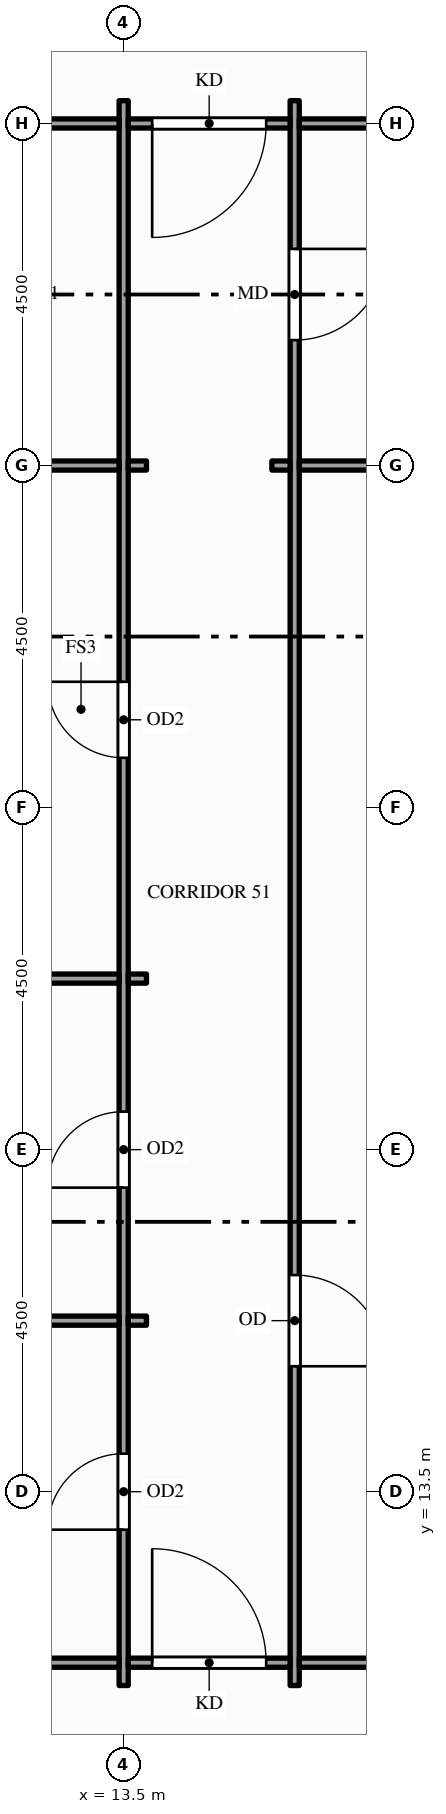
"""IFC4 building model, lengths in metres.
Left out: names, types, materials, properties, quantities, classifications, styles, units other than length and angle.
Written with IfcOpenShell. Run it as: python <this file> out.ifc"""

import sys

from ifc_helpers import new_model, si_unit, direction, frame, frame_2d, origin, place, context, subcontext, project, spatial, rectangle, extrude, element, fill, save


model = new_model("IFC4")
c1 = context("Model", 3, precision=1e-05, world=origin(), true_north=direction((0.0, 1.0)))
c2 = subcontext(c1, "Body", "Model", "MODEL_VIEW")
j1 = project(units=[si_unit("LENGTHUNIT", "METRE"), si_unit("PLANEANGLEUNIT", "RADIAN")], contexts=[c1])
p1 = place(None, origin())
s1 = spatial("IfcSite", under=j1, at=p1, CompositionType="ELEMENT")
p2 = place(p1, origin())
s2 = spatial("IfcBuilding", under=s1, at=p2, CompositionType="ELEMENT")
p3 = place(p2, frame((0.0, 0.0, 95.0)))
s3 = spatial("IfcBuildingStorey", under=s2, at=p3, CompositionType="ELEMENT", Elevation=95.0)
p4 = place(p3, frame((13.5, 10.95, 0.0), z_axis=(0.0, 0.0, 1.0), x_axis=(0.0, 1.0, 0.0)))
e1 = element("IfcWall", 1, at=p4, inside=s3, PredefinedType="PARTITIONING", context=c2, shape_type="SweptSolid", body=[
    extrude(rectangle(XDim=20.85, YDim=0.12, at=frame_2d((10.425, 0.0))), origin(), (0.0, 0.0, 1.0), 2.6),
])
p5 = place(p4, frame((2.05, 0.0, 0.0)))
e2 = element("IfcOpeningElement", 2, at=p5, cuts=e1, PredefinedType="OPENING", context=c2, shape_type="SweptSolid", body=[
    extrude(rectangle(XDim=1.0, YDim=2.1, at=frame_2d((0.5, 1.05))), frame((0.0, 0.07, 0.0), z_axis=(0.0, -1.0, 0.0), x_axis=(1.0, 0.0, 0.0)), (0.0, 0.0, 1.0), 0.14),
])
p6 = place(p4, frame((6.55, 0.0, 0.0)))
e3 = element("IfcOpeningElement", 3, at=p6, cuts=e1, PredefinedType="OPENING", context=c2, shape_type="SweptSolid", body=[
    extrude(rectangle(XDim=1.0, YDim=2.1, at=frame_2d((0.5, 1.05))), frame((0.0, 0.07, 0.0), z_axis=(0.0, -1.0, 0.0), x_axis=(1.0, 0.0, 0.0)), (0.0, 0.0, 1.0), 0.14),
])
p7 = place(p4, frame((12.205, 0.0, 0.0)))
e4 = element("IfcOpeningElement", 4, at=p7, cuts=e1, PredefinedType="OPENING", context=c2, shape_type="SweptSolid", body=[
    extrude(rectangle(XDim=1.0, YDim=2.1, at=frame_2d((0.5, 1.05))), frame((0.0, 0.07, 0.0), z_axis=(0.0, -1.0, 0.0), x_axis=(1.0, 0.0, 0.0)), (0.0, 0.0, 1.0), 0.14),
])
p8 = place(p3, frame((15.75, 10.95, 0.0), z_axis=(0.0, 0.0, 1.0), x_axis=(0.0, 1.0, 0.0)))
e5 = element("IfcWall", 5, at=p8, inside=s3, PredefinedType="PARTITIONING", context=c2, shape_type="SweptSolid", body=[
    extrude(rectangle(XDim=20.85, YDim=0.12, at=frame_2d((10.425, 0.0))), origin(), (0.0, 0.0, 1.0), 2.6),
])
p9 = place(p8, frame((17.7, 0.0, 0.0)))
e6 = element("IfcOpeningElement", 6, at=p9, cuts=e5, PredefinedType="OPENING", context=c2, shape_type="SweptSolid", body=[
    extrude(rectangle(XDim=1.2, YDim=2.1, at=frame_2d((0.6, 1.05))), frame((0.0, 0.07, 0.0), z_axis=(0.0, -1.0, 0.0), x_axis=(1.0, 0.0, 0.0)), (0.0, 0.0, 1.0), 0.14),
])
p10 = place(p8, frame((4.2, 0.0, 0.0)))
e7 = element("IfcOpeningElement", 7, at=p10, cuts=e5, PredefinedType="OPENING", context=c2, shape_type="SweptSolid", body=[
    extrude(rectangle(XDim=1.2, YDim=2.1, at=frame_2d((0.6, 1.05))), frame((0.0, 0.07, 0.0), z_axis=(0.0, -1.0, 0.0), x_axis=(1.0, 0.0, 0.0)), (0.0, 0.0, 1.0), 0.14),
])
p11 = place(p3, frame((0.15, 11.25, 0.0), z_axis=(0.0, 0.0, 1.0), x_axis=(1.0, 0.0, 0.0)))
e8 = element("IfcWall", 8, at=p11, inside=s3, PredefinedType="PARTITIONING", context=c2, shape_type="SweptSolid", body=[
    extrude(rectangle(XDim=13.29, YDim=0.12, at=frame_2d((6.645, 0.0))), origin(), (0.0, 0.0, 1.0), 2.938),
])
p12 = place(p3, frame((13.56, 11.25, 0.0), z_axis=(0.0, 0.0, 1.0), x_axis=(1.0, 0.0, 0.0)))
e9 = element("IfcWall", 9, at=p12, inside=s3, PredefinedType="PARTITIONING", context=c2, shape_type="SweptSolid", body=[
    extrude(rectangle(XDim=2.13, YDim=0.12, at=frame_2d((1.065, 0.0))), origin(), (0.0, 0.0, 1.0), 2.938),
])
p13 = place(p12, frame((0.315, 0.0, 0.0)))
e10 = element("IfcOpeningElement", 10, at=p13, cuts=e9, PredefinedType="OPENING", context=c2, shape_type="SweptSolid", body=[
    extrude(rectangle(XDim=1.5, YDim=2.1, at=frame_2d((0.75, 1.05))), frame((0.0, 0.07, 0.0), z_axis=(0.0, -1.0, 0.0), x_axis=(1.0, 0.0, 0.0)), (0.0, 0.0, 1.0), 0.14),
])
p14 = place(p3, frame((15.81, 11.25, 0.0), z_axis=(0.0, 0.0, 1.0), x_axis=(1.0, 0.0, 0.0)))
e11 = element("IfcWall", 11, at=p14, inside=s3, PredefinedType="PARTITIONING", context=c2, shape_type="SweptSolid", body=[
    extrude(rectangle(XDim=13.38, YDim=0.12, at=frame_2d((6.69, 0.0))), origin(), (0.0, 0.0, 1.0), 2.76),
])
p15 = place(p14, frame((3.54, 0.0, 0.0)))
e12 = element("IfcOpeningElement", 12, at=p15, cuts=e11, PredefinedType="OPENING", context=c2, shape_type="SweptSolid", body=[
    extrude(rectangle(XDim=1.8, YDim=2.1, at=frame_2d((0.9, 1.05))), frame((0.0, 0.07, 0.0), z_axis=(0.0, -1.0, 0.0), x_axis=(1.0, 0.0, 0.0)), (0.0, 0.0, 1.0), 0.14),
])
p16 = place(p3, frame((0.15, 15.75, 0.0), z_axis=(0.0, 0.0, 1.0), x_axis=(1.0, 0.0, 0.0)))
e13 = element("IfcWall", 13, at=p16, inside=s3, PredefinedType="PARTITIONING", context=c2, shape_type="SweptSolid", body=[
    extrude(rectangle(XDim=13.29, YDim=0.12, at=frame_2d((6.645, 0.0))), origin(), (0.0, 0.0, 1.0), 2.938),
])
p17 = place(p3, frame((13.56, 15.75, 0.0), z_axis=(0.0, 0.0, 1.0), x_axis=(1.0, 0.0, 0.0)))
e14 = element("IfcWall", 14, at=p17, inside=s3, PredefinedType="PARTITIONING", context=c2, shape_type="SweptSolid", body=[
    extrude(rectangle(XDim=0.24, YDim=0.12, at=frame_2d((0.12, 0.0))), origin(), (0.0, 0.0, 1.0), 2.938),
])
p18 = place(p3, frame((0.15, 20.25, 0.0), z_axis=(0.0, 0.0, 1.0), x_axis=(1.0, 0.0, 0.0)))
e15 = element("IfcWall", 15, at=p18, inside=s3, PredefinedType="PARTITIONING", context=c2, shape_type="SweptSolid", body=[
    extrude(rectangle(XDim=13.29, YDim=0.12, at=frame_2d((6.645, 0.0))), origin(), (0.0, 0.0, 1.0), 2.938),
])
p19 = place(p3, frame((13.56, 20.25, 0.0), z_axis=(0.0, 0.0, 1.0), x_axis=(1.0, 0.0, 0.0)))
e16 = element("IfcWall", 16, at=p19, inside=s3, PredefinedType="PARTITIONING", context=c2, shape_type="SweptSolid", body=[
    extrude(rectangle(XDim=0.24, YDim=0.12, at=frame_2d((0.12, 0.0))), origin(), (0.0, 0.0, 1.0), 2.938),
])
p20 = place(p3, frame((9.56, 27.0, 0.0), z_axis=(0.0, 0.0, 1.0), x_axis=(1.0, 0.0, 0.0)))
e17 = element("IfcWall", 17, at=p20, inside=s3, PredefinedType="PARTITIONING", context=c2, shape_type="SweptSolid", body=[
    extrude(rectangle(XDim=3.88, YDim=0.12, at=frame_2d((1.94, 0.0))), origin(), (0.0, 0.0, 1.0), 2.938),
])
for number, where, z_axis, x_axis in (
    (18, (13.56, 27.0, 0.0), (0.0, 0.0, 1.0), (1.0, 0.0, 0.0)),
    (19, (15.45, 27.0, 0.0), (0.0, 0.0, 1.0), (1.0, 0.0, 0.0)),
):
    element("IfcWall", number, at=place(p3, frame(where, z_axis=z_axis, x_axis=x_axis)), inside=s3, PredefinedType="PARTITIONING", context=c2, shape_type="SweptSolid", body=[
        extrude(rectangle(XDim=0.24, YDim=0.12, at=frame_2d((0.12, 0.0))), origin(), (0.0, 0.0, 1.0), 2.938),
    ])
p21 = place(p3, frame((15.81, 27.0, 0.0), z_axis=(0.0, 0.0, 1.0), x_axis=(1.0, 0.0, 0.0)))
e20 = element("IfcWall", 20, at=p21, inside=s3, PredefinedType="PARTITIONING", context=c2, shape_type="SweptSolid", body=[
    extrude(rectangle(XDim=8.04, YDim=0.12, at=frame_2d((4.02, 0.0))), origin(), (0.0, 0.0, 1.0), 2.938),
])
p22 = place(p3, frame((9.56, 31.5, 0.0), z_axis=(0.0, 0.0, 1.0), x_axis=(1.0, 0.0, 0.0)))
e21 = element("IfcWall", 21, at=p22, inside=s3, PredefinedType="PARTITIONING", context=c2, shape_type="SweptSolid", body=[
    extrude(rectangle(XDim=3.88, YDim=0.12, at=frame_2d((1.94, 0.0))), origin(), (0.0, 0.0, 1.0), 2.938),
])
p23 = place(p22, frame((1.44, 0.0, 0.0)))
e22 = element("IfcOpeningElement", 22, at=p23, cuts=e21, PredefinedType="OPENING", context=c2, shape_type="SweptSolid", body=[
    extrude(rectangle(XDim=1.0, YDim=2.1, at=frame_2d((0.5, 1.05))), frame((0.0, 0.07, 0.0), z_axis=(0.0, -1.0, 0.0), x_axis=(1.0, 0.0, 0.0)), (0.0, 0.0, 1.0), 0.14),
])
p24 = place(p3, frame((13.56, 31.5, 0.0), z_axis=(0.0, 0.0, 1.0), x_axis=(1.0, 0.0, 0.0)))
e23 = element("IfcWall", 23, at=p24, inside=s3, PredefinedType="PARTITIONING", context=c2, shape_type="SweptSolid", body=[
    extrude(rectangle(XDim=2.13, YDim=0.12, at=frame_2d((1.065, 0.0))), origin(), (0.0, 0.0, 1.0), 2.938),
])
p25 = place(p24, frame((0.315, 0.0, 0.0)))
e24 = element("IfcOpeningElement", 24, at=p25, cuts=e23, PredefinedType="OPENING", context=c2, shape_type="SweptSolid", body=[
    extrude(rectangle(XDim=1.5, YDim=2.1, at=frame_2d((0.75, 1.05))), frame((0.0, 0.07, 0.0), z_axis=(0.0, -1.0, 0.0), x_axis=(1.0, 0.0, 0.0)), (0.0, 0.0, 1.0), 0.14),
])
p26 = place(p3, frame((15.81, 31.5, 0.0), z_axis=(0.0, 0.0, 1.0), x_axis=(1.0, 0.0, 0.0)))
e25 = element("IfcWall", 25, at=p26, inside=s3, PredefinedType="PARTITIONING", context=c2, shape_type="SweptSolid", body=[
    extrude(rectangle(XDim=8.04, YDim=0.12, at=frame_2d((4.02, 0.0))), origin(), (0.0, 0.0, 1.0), 2.938),
])
p27 = place(p13, origin())
e26 = element("IfcDoor", 26, at=p27, inside=s3, OperationType="SINGLE_SWING_LEFT", PredefinedType="DOOR", context=c2, shape_type="SweptSolid", body=[
    extrude(rectangle(XDim=1.5, YDim=2.1, at=frame_2d((0.75, 1.05))), frame((0.0, 0.025, 0.0), z_axis=(0.0, -1.0, 0.0), x_axis=(1.0, 0.0, 0.0)), (0.0, 0.0, 1.0), 0.05),
])
fill(e10, e26)
p28 = place(p25, origin())
e27 = element("IfcDoor", 27, at=p28, inside=s3, OperationType="SINGLE_SWING_LEFT", PredefinedType="DOOR", context=c2, shape_type="SweptSolid", body=[
    extrude(rectangle(XDim=1.5, YDim=2.1, at=frame_2d((0.75, 1.05))), frame((0.0, 0.025, 0.0), z_axis=(0.0, -1.0, 0.0), x_axis=(1.0, 0.0, 0.0)), (0.0, 0.0, 1.0), 0.05),
])
fill(e24, e27)
p29 = place(p5, origin())
e28 = element("IfcDoor", 28, at=p29, inside=s3, OperationType="SINGLE_SWING_LEFT", PredefinedType="DOOR", context=c2, shape_type="SweptSolid", body=[
    extrude(rectangle(XDim=1.0, YDim=2.1, at=frame_2d((0.5, 1.05))), frame((0.0, 0.025, 0.0), z_axis=(0.0, -1.0, 0.0), x_axis=(1.0, 0.0, 0.0)), (0.0, 0.0, 1.0), 0.05),
])
fill(e2, e28)
p30 = place(p6, origin())
e29 = element("IfcDoor", 29, at=p30, inside=s3, OperationType="SINGLE_SWING_LEFT", PredefinedType="DOOR", context=c2, shape_type="SweptSolid", body=[
    extrude(rectangle(XDim=1.0, YDim=2.1, at=frame_2d((0.5, 1.05))), frame((0.0, 0.025, 0.0), z_axis=(0.0, -1.0, 0.0), x_axis=(1.0, 0.0, 0.0)), (0.0, 0.0, 1.0), 0.05),
])
fill(e3, e29)
p31 = place(p7, origin())
e30 = element("IfcDoor", 30, at=p31, inside=s3, OperationType="SINGLE_SWING_RIGHT", PredefinedType="DOOR", context=c2, shape_type="SweptSolid", body=[
    extrude(rectangle(XDim=1.0, YDim=2.1, at=frame_2d((0.5, 1.05))), frame((0.0, 0.025, 0.0), z_axis=(0.0, -1.0, 0.0), x_axis=(1.0, 0.0, 0.0)), (0.0, 0.0, 1.0), 0.05),
])
fill(e4, e30)
p32 = place(p9, origin())
e31 = element("IfcDoor", 31, at=p32, inside=s3, OperationType="SINGLE_SWING_RIGHT", PredefinedType="DOOR", context=c2, shape_type="SweptSolid", body=[
    extrude(rectangle(XDim=1.2, YDim=2.1, at=frame_2d((0.6, 1.05))), frame((0.0, 0.025, 0.0), z_axis=(0.0, -1.0, 0.0), x_axis=(1.0, 0.0, 0.0)), (0.0, 0.0, 1.0), 0.05),
])
fill(e6, e31)
p33 = place(p10, origin())
e32 = element("IfcDoor", 32, at=p33, inside=s3, OperationType="SINGLE_SWING_LEFT", PredefinedType="DOOR", context=c2, shape_type="SweptSolid", body=[
    extrude(rectangle(XDim=1.2, YDim=2.1, at=frame_2d((0.6, 1.05))), frame((0.0, 0.025, 0.0), z_axis=(0.0, -1.0, 0.0), x_axis=(1.0, 0.0, 0.0)), (0.0, 0.0, 1.0), 0.05),
])
fill(e7, e32)
save(model, sys.argv[1])
